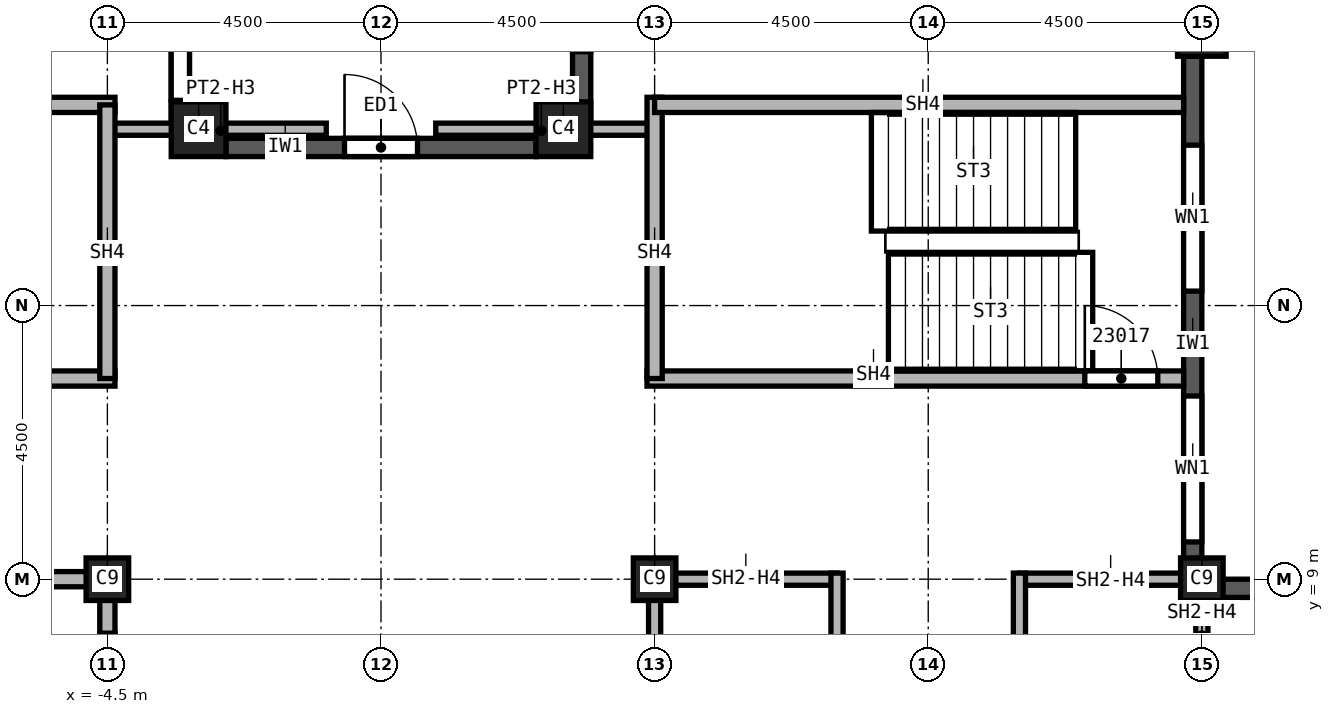
"""IFC4 building model, lengths in metres.
Left out: names, types, materials, properties, quantities, classifications, styles, units other than length and angle.
Written with IfcOpenShell. Run it as: python <this file> out.ifc"""

import sys

from ifc_helpers import new_model, si_unit, direction, frame, frame_2d, origin, origin_2d, place, context, subcontext, project, spatial, rectangle, extrude, element, fill, save


model = new_model("IFC4")
c1 = context("Model", 3, precision=1e-05, world=origin(), true_north=direction((0.0, 1.0)))
c2 = subcontext(c1, "Body", "Model", "MODEL_VIEW")
j1 = project(units=[si_unit("LENGTHUNIT", "METRE"), si_unit("PLANEANGLEUNIT", "RADIAN")], contexts=[c1])
p1 = place(None, origin())
s1 = spatial("IfcSite", under=j1, at=p1, CompositionType="ELEMENT")
p2 = place(p1, origin())
s2 = spatial("IfcBuilding", under=s1, at=p2, CompositionType="ELEMENT")
p3 = place(p2, frame((0.0, 0.0, 326.0)))
s3 = spatial("IfcBuildingStorey", under=s2, at=p3, CompositionType="ELEMENT", Elevation=326.0)
p4 = place(p3, frame((13.5, 18.0, 0.0), z_axis=(0.0, 0.0, 1.0), x_axis=(1.0, 0.0, 0.0)))
e1 = element("IfcColumn", 1, at=p4, inside=s3, PredefinedType="COLUMN", context=c2, shape_type="SweptSolid", body=[
    extrude(rectangle(XDim=0.8, YDim=0.8, at=origin_2d()), origin(), (0.0, 0.0, 1.0), 3.74),
])
for number, where, z_axis, x_axis in (
    (2, (4.5, 9.0, 0.0), (0.0, 0.0, 1.0), (1.0, 0.0, 0.0)),
    (3, (13.5, 9.0, 0.0), (0.0, 0.0, 1.0), (1.0, 0.0, 0.0)),
    (4, (-4.5, 9.0, 0.0), (0.0, 0.0, 1.0), (1.0, 0.0, 0.0)),
):
    element("IfcColumn", number, at=place(p3, frame(where, z_axis=z_axis, x_axis=x_axis)), inside=s3, PredefinedType="COLUMN", context=c2, shape_type="SweptSolid", body=[
        extrude(rectangle(XDim=0.7, YDim=0.7, at=origin_2d()), origin(), (0.0, 0.0, 1.0), 3.74),
    ])
for number, where, z_axis, x_axis in (
    (5, (3.0, 16.4, 0.0), (0.0, 0.0, 1.0), (1.0, 0.0, 0.0)),
    (6, (-3.0, 16.4, 0.0), (0.0, 0.0, 1.0), (1.0, 0.0, 0.0)),
):
    element("IfcColumn", number, at=place(p3, frame(where, z_axis=z_axis, x_axis=x_axis)), inside=s3, PredefinedType="COLUMN", context=c2, shape_type="SweptSolid", body=[
        extrude(rectangle(XDim=0.9, YDim=0.9, at=origin_2d()), origin(), (0.0, 0.0, 1.0), 3.74),
    ])
p5 = place(p3, frame((3.3, 24.95, 0.0), z_axis=(0.0, 0.0, 1.0), x_axis=(0.0, -1.0, 0.0)))
e7 = element("IfcWall", 7, at=p5, inside=s3, PredefinedType="SOLIDWALL", context=c2, shape_type="SweptSolid", body=[
    extrude(rectangle(XDim=8.5, YDim=0.3, at=frame_2d((4.25, 0.0))), origin(), (0.0, 0.0, 1.0), 3.14),
])
p6 = place(p5, frame((0.825, 0.0, 0.8)))
e8 = element("IfcOpeningElement", 8, at=p6, cuts=e7, PredefinedType="OPENING", context=c2, shape_type="SweptSolid", body=[
    extrude(rectangle(XDim=2.4, YDim=1.95, at=frame_2d((1.2, 0.975))), frame((0.0, 0.15, 0.0), z_axis=(0.0, -1.0, 0.0), x_axis=(1.0, 0.0, 0.0)), (0.0, 0.0, 1.0), 0.3),
])
p7 = place(p5, frame((4.875, 0.0, 0.8)))
e9 = element("IfcOpeningElement", 9, at=p7, cuts=e7, PredefinedType="OPENING", context=c2, shape_type="SweptSolid", body=[
    extrude(rectangle(XDim=2.4, YDim=1.95, at=frame_2d((1.2, 0.975))), frame((0.0, 0.15, 0.0), z_axis=(0.0, -1.0, 0.0), x_axis=(1.0, 0.0, 0.0)), (0.0, 0.0, 1.0), 0.3),
])
p8 = place(p3, frame((-2.55, 16.1, 0.0), z_axis=(0.0, 0.0, 1.0), x_axis=(1.0, 0.0, 0.0)))
e10 = element("IfcWall", 10, at=p8, inside=s3, PredefinedType="SOLIDWALL", context=c2, shape_type="SweptSolid", body=[
    extrude(rectangle(XDim=5.1, YDim=0.3, at=frame_2d((2.55, 0.0))), origin(), (0.0, 0.0, 1.0), 3.14),
])
p9 = place(p8, frame((1.95, 0.0, 0.0)))
e11 = element("IfcOpeningElement", 11, at=p9, cuts=e10, PredefinedType="OPENING", context=c2, shape_type="SweptSolid", body=[
    extrude(rectangle(XDim=1.2, YDim=2.4, at=frame_2d((0.6, 1.2))), frame((0.0, 0.15, 0.0), z_axis=(0.0, -1.0, 0.0), x_axis=(1.0, 0.0, 0.0)), (0.0, 0.0, 1.0), 0.3),
])
p10 = place(p3, frame((-3.3, 16.45, 0.0), z_axis=(0.0, 0.0, 1.0), x_axis=(0.0, 1.0, 0.0)))
e12 = element("IfcWall", 12, at=p10, inside=s3, PredefinedType="SOLIDWALL", context=c2, shape_type="SweptSolid", body=[
    extrude(rectangle(XDim=8.5, YDim=0.3, at=frame_2d((4.25, 0.0))), origin(), (0.0, 0.0, 1.0), 3.14),
])
p11 = place(p10, frame((0.425, 0.0, 0.8)))
e13 = element("IfcOpeningElement", 13, at=p11, cuts=e12, PredefinedType="OPENING", context=c2, shape_type="SweptSolid", body=[
    extrude(rectangle(XDim=2.4, YDim=1.95, at=frame_2d((1.2, 0.975))), frame((0.0, 0.15, 0.0), z_axis=(0.0, -1.0, 0.0), x_axis=(1.0, 0.0, 0.0)), (0.0, 0.0, 1.0), 0.3),
])
p12 = place(p10, frame((4.475, 0.0, 0.8)))
e14 = element("IfcOpeningElement", 14, at=p12, cuts=e12, PredefinedType="OPENING", context=c2, shape_type="SweptSolid", body=[
    extrude(rectangle(XDim=2.4, YDim=1.95, at=frame_2d((1.2, 0.975))), frame((0.0, 0.15, 0.0), z_axis=(0.0, -1.0, 0.0), x_axis=(1.0, 0.0, 0.0)), (0.0, 0.0, 1.0), 0.3),
])
p13 = place(p3, frame((13.35, 9.05, 0.0), z_axis=(0.0, 0.0, 1.0), x_axis=(0.0, 1.0, 0.0)))
e15 = element("IfcWall", 15, at=p13, inside=s3, PredefinedType="SOLIDWALL", context=c2, shape_type="SweptSolid", body=[
    extrude(rectangle(XDim=8.55, YDim=0.3, at=frame_2d((4.275, 0.0))), origin(), (0.0, 0.0, 1.0), 3.14),
])
p14 = place(p13, frame((0.562, 0.0, 0.8)))
e16 = element("IfcOpeningElement", 16, at=p14, cuts=e15, PredefinedType="OPENING", context=c2, shape_type="SweptSolid", body=[
    extrude(rectangle(XDim=2.4, YDim=1.95, at=frame_2d((1.2, 0.975))), frame((0.0, 0.15, 0.0), z_axis=(0.0, -1.0, 0.0), x_axis=(1.0, 0.0, 0.0)), (0.0, 0.0, 1.0), 0.3),
])
p15 = place(p13, frame((4.688, 0.0, 0.8)))
e17 = element("IfcOpeningElement", 17, at=p15, cuts=e15, PredefinedType="OPENING", context=c2, shape_type="SweptSolid", body=[
    extrude(rectangle(XDim=2.4, YDim=1.95, at=frame_2d((1.2, 0.975))), frame((0.0, 0.15, 0.0), z_axis=(0.0, -1.0, 0.0), x_axis=(1.0, 0.0, 0.0)), (0.0, 0.0, 1.0), 0.3),
])
p16 = place(p3, frame((22.1, 8.85, 0.0), z_axis=(0.0, 0.0, 1.0), x_axis=(-1.0, 0.0, 0.0)))
e18 = element("IfcWall", 18, at=p16, inside=s3, PredefinedType="SOLIDWALL", context=c2, shape_type="SweptSolid", body=[
    extrude(rectangle(XDim=8.55, YDim=0.3, at=frame_2d((4.275, 0.0))), origin(), (0.0, 0.0, 1.0), 3.14),
])
p17 = place(p16, frame((1.756, 0.0, 0.8)))
e19 = element("IfcOpeningElement", 19, at=p17, cuts=e18, PredefinedType="OPENING", context=c2, shape_type="SweptSolid", body=[
    extrude(rectangle(XDim=1.4, YDim=1.95, at=frame_2d((0.7, 0.975))), frame((0.0, 0.15, 0.0), z_axis=(0.0, -1.0, 0.0), x_axis=(1.0, 0.0, 0.0)), (0.0, 0.0, 1.0), 0.3),
])
p18 = place(p16, frame((5.044, 0.0, 0.8)))
e20 = element("IfcOpeningElement", 20, at=p18, cuts=e18, PredefinedType="OPENING", context=c2, shape_type="SweptSolid", body=[
    extrude(rectangle(XDim=1.4, YDim=1.95, at=frame_2d((0.7, 0.975))), frame((0.0, 0.15, 0.0), z_axis=(0.0, -1.0, 0.0), x_axis=(1.0, 0.0, 0.0)), (0.0, 0.0, 1.0), 0.3),
])
for number, where, z_axis, x_axis in (
    (21, (-4.5, 16.4, 0.0), (0.0, 0.0, 1.0), (1.0, 0.0, 0.0)),
    (22, (0.9, 16.4, 0.0), (0.0, 0.0, 1.0), (1.0, 0.0, 0.0)),
):
    element("IfcWall", number, at=place(p3, frame(where, z_axis=z_axis, x_axis=x_axis)), inside=s3, PredefinedType="PARTITIONING", context=c2, shape_type="SweptSolid", body=[
        extrude(rectangle(XDim=3.6, YDim=0.2, at=frame_2d((1.8, 0.0))), origin(), (0.0, 0.0, 1.0), 3.204),
    ])
p19 = place(p3, frame((4.5, -6.0, 0.0), z_axis=(0.0, 0.0, 1.0), x_axis=(0.0, 1.0, 0.0)))
e23 = element("IfcWall", 23, at=p19, inside=s3, PredefinedType="SOLIDWALL", context=c2, shape_type="SweptSolid", body=[
    extrude(rectangle(XDim=15.1, YDim=0.2, at=frame_2d((7.55, 0.0))), origin(), (0.0, 0.0, 1.0), 3.062),
])
p20 = place(p19, frame((0.25, 0.0, 0.0)))
e24 = element("IfcOpeningElement", 24, at=p20, cuts=e23, PredefinedType="OPENING", context=c2, shape_type="SweptSolid", body=[
    extrude(rectangle(XDim=1.1, YDim=2.1, at=frame_2d((0.55, 1.05))), frame((0.0, 0.1, 0.0), z_axis=(0.0, -1.0, 0.0), x_axis=(1.0, 0.0, 0.0)), (0.0, 0.0, 1.0), 0.2),
])
p21 = place(p19, frame((6.85, 0.0, 0.0)))
e25 = element("IfcOpeningElement", 25, at=p21, cuts=e23, PredefinedType="OPENING", context=c2, shape_type="SweptSolid", body=[
    extrude(rectangle(XDim=1.1, YDim=2.1, at=frame_2d((0.55, 1.05))), frame((0.0, 0.1, 0.0), z_axis=(0.0, -1.0, 0.0), x_axis=(1.0, 0.0, 0.0)), (0.0, 0.0, 1.0), 0.2),
])
p22 = place(p3, frame((4.5, 9.0, 0.0), z_axis=(0.0, 0.0, 1.0), x_axis=(1.0, 0.0, 0.0)))
e26 = element("IfcWall", 26, at=p22, inside=s3, PredefinedType="SOLIDWALL", context=c2, shape_type="SweptSolid", body=[
    extrude(rectangle(XDim=3.0, YDim=0.2, at=frame_2d((1.5, 0.0))), origin(), (0.0, 0.0, 1.0), 3.062),
])
p23 = place(p3, frame((7.5, 9.1, 0.0), z_axis=(0.0, 0.0, 1.0), x_axis=(0.0, -1.0, 0.0)))
e27 = element("IfcWall", 27, at=p23, inside=s3, PredefinedType="SOLIDWALL", context=c2, shape_type="SweptSolid", body=[
    extrude(rectangle(XDim=6.225, YDim=0.2, at=frame_2d((3.113, 0.0))), origin(), (0.0, 0.0, 1.0), 3.74),
])
p24 = place(p3, frame((10.5, 9.0, 0.0), z_axis=(0.0, 0.0, 1.0), x_axis=(1.0, 0.0, 0.0)))
e28 = element("IfcWall", 28, at=p24, inside=s3, PredefinedType="SOLIDWALL", context=c2, shape_type="SweptSolid", body=[
    extrude(rectangle(XDim=3.0, YDim=0.2, at=frame_2d((1.5, 0.0))), origin(), (0.0, 0.0, 1.0), 3.062),
])
p25 = place(p3, frame((10.5, 9.1, 0.0), z_axis=(0.0, 0.0, 1.0), x_axis=(0.0, -1.0, 0.0)))
e29 = element("IfcWall", 29, at=p25, inside=s3, PredefinedType="SOLIDWALL", context=c2, shape_type="SweptSolid", body=[
    extrude(rectangle(XDim=3.225, YDim=0.2, at=frame_2d((1.613, 0.0))), origin(), (0.0, 0.0, 1.0), 3.74),
])
p26 = place(p3, frame((13.5, 9.05, 0.0), z_axis=(0.0, 0.0, 1.0), x_axis=(0.0, -1.0, 0.0)))
e30 = element("IfcWall", 30, at=p26, inside=s3, PredefinedType="SOLIDWALL", context=c2, shape_type="SweptSolid", body=[
    extrude(rectangle(XDim=3.05, YDim=0.2, at=frame_2d((1.525, 0.0))), origin(), (0.0, 0.0, 1.0), 3.062),
])
p27 = place(p26, frame((1.6, 0.0, 0.0)))
e31 = element("IfcOpeningElement", 31, at=p27, cuts=e30, PredefinedType="OPENING", context=c2, shape_type="SweptSolid", body=[
    extrude(rectangle(XDim=1.1, YDim=2.1, at=frame_2d((0.55, 1.05))), frame((0.0, 0.1, 0.0), z_axis=(0.0, -1.0, 0.0), x_axis=(1.0, 0.0, 0.0)), (0.0, 0.0, 1.0), 0.2),
])
p28 = place(p3, frame((-7.5, 9.0, 0.0), z_axis=(0.0, 0.0, 1.0), x_axis=(1.0, 0.0, 0.0)))
e32 = element("IfcWall", 32, at=p28, inside=s3, PredefinedType="SOLIDWALL", context=c2, shape_type="SweptSolid", body=[
    extrude(rectangle(XDim=3.0, YDim=0.25, at=frame_2d((1.5, 0.0))), origin(), (0.0, 0.0, 1.0), 3.062),
])
p29 = place(p3, frame((-4.5, 9.125, 0.0), z_axis=(0.0, 0.0, 1.0), x_axis=(0.0, -1.0, 0.0)))
e33 = element("IfcWall", 33, at=p29, inside=s3, PredefinedType="SOLIDWALL", context=c2, shape_type="SweptSolid", body=[
    extrude(rectangle(XDim=3.125, YDim=0.25, at=frame_2d((1.562, 0.0))), origin(), (0.0, 0.0, 1.0), 3.062),
])
p30 = place(p29, frame((1.012, 0.0, 0.0)))
e34 = element("IfcOpeningElement", 34, at=p30, cuts=e33, PredefinedType="OPENING", context=c2, shape_type="SweptSolid", body=[
    extrude(rectangle(XDim=1.1, YDim=2.1, at=frame_2d((0.55, 1.05))), frame((0.0, 0.125, 0.0), z_axis=(0.0, -1.0, 0.0), x_axis=(1.0, 0.0, 0.0)), (0.0, 0.0, 1.0), 0.25),
])
p31 = place(p3, frame((-13.5, 12.3, 0.0), z_axis=(0.0, 0.0, 1.0), x_axis=(1.0, 0.0, 0.0)))
e35 = element("IfcWall", 35, at=p31, inside=s3, PredefinedType="SOLIDWALL", context=c2, shape_type="SweptSolid", body=[
    extrude(rectangle(XDim=9.125, YDim=0.25, at=frame_2d((4.562, 0.0))), origin(), (0.0, 0.0, 1.0), 3.74),
])
p32 = place(p31, frame((0.6, 0.0, 0.0)))
e36 = element("IfcOpeningElement", 36, at=p32, cuts=e35, PredefinedType="OPENING", context=c2, shape_type="SweptSolid", body=[
    extrude(rectangle(XDim=1.2, YDim=2.1, at=frame_2d((0.6, 1.05))), frame((0.0, 0.125, 0.0), z_axis=(0.0, -1.0, 0.0), x_axis=(1.0, 0.0, 0.0)), (0.0, 0.0, 1.0), 0.25),
])
p33 = place(p3, frame((-13.5, 16.8, 0.0), z_axis=(0.0, 0.0, 1.0), x_axis=(1.0, 0.0, 0.0)))
e37 = element("IfcWall", 37, at=p33, inside=s3, PredefinedType="SOLIDWALL", context=c2, shape_type="SweptSolid", body=[
    extrude(rectangle(XDim=9.125, YDim=0.25, at=frame_2d((4.562, 0.0))), origin(), (0.0, 0.0, 1.0), 3.74),
])
p34 = place(p3, frame((-4.5, 16.8, 0.0), z_axis=(0.0, 0.0, 1.0), x_axis=(0.0, -1.0, 0.0)))
e38 = element("IfcWall", 38, at=p34, inside=s3, PredefinedType="SOLIDWALL", context=c2, shape_type="SweptSolid", body=[
    extrude(rectangle(XDim=4.5, YDim=0.25, at=frame_2d((2.25, 0.0))), origin(), (0.0, 0.0, 1.0), 3.74),
])
p35 = place(p3, frame((4.375, 12.3, 0.0), z_axis=(0.0, 0.0, 1.0), x_axis=(1.0, 0.0, 0.0)))
e39 = element("IfcWall", 39, at=p35, inside=s3, PredefinedType="SOLIDWALL", context=c2, shape_type="SweptSolid", body=[
    extrude(rectangle(XDim=8.825, YDim=0.25, at=frame_2d((4.413, 0.0))), origin(), (0.0, 0.0, 1.0), 3.74),
])
p36 = place(p35, frame((7.2, 0.0, 0.0)))
e40 = element("IfcOpeningElement", 40, at=p36, cuts=e39, PredefinedType="OPENING", context=c2, shape_type="SweptSolid", body=[
    extrude(rectangle(XDim=1.2, YDim=2.1, at=frame_2d((0.6, 1.05))), frame((0.0, 0.125, 0.0), z_axis=(0.0, -1.0, 0.0), x_axis=(1.0, 0.0, 0.0)), (0.0, 0.0, 1.0), 0.25),
])
p37 = place(p3, frame((4.5, 12.3, 0.0), z_axis=(0.0, 0.0, 1.0), x_axis=(0.0, 1.0, 0.0)))
e41 = element("IfcWall", 41, at=p37, inside=s3, PredefinedType="SOLIDWALL", context=c2, shape_type="SweptSolid", body=[
    extrude(rectangle(XDim=4.625, YDim=0.25, at=frame_2d((2.312, 0.0))), origin(), (0.0, 0.0, 1.0), 3.74),
])
p38 = place(p3, frame((4.5, 16.8, 0.0), z_axis=(0.0, 0.0, 1.0), x_axis=(1.0, 0.0, 0.0)))
e42 = element("IfcWall", 42, at=p38, inside=s3, PredefinedType="SOLIDWALL", context=c2, shape_type="SweptSolid", body=[
    extrude(rectangle(XDim=8.7, YDim=0.25, at=frame_2d((4.35, 0.0))), origin(), (0.0, 0.0, 1.0), 3.74),
])
p39 = place(p9, origin())
e43 = element("IfcDoor", 43, at=p39, inside=s3, OperationType="SINGLE_SWING_LEFT", PredefinedType="DOOR", context=c2, shape_type="SweptSolid", body=[
    extrude(rectangle(XDim=1.2, YDim=2.4, at=frame_2d((0.6, 1.2))), frame((0.0, 0.025, 0.0), z_axis=(0.0, -1.0, 0.0), x_axis=(1.0, 0.0, 0.0)), (0.0, 0.0, 1.0), 0.05),
])
fill(e11, e43)
p40 = place(p11, origin())
e44 = element("IfcWindow", 44, at=p40, inside=s3, PartitioningType="SINGLE_PANEL", PredefinedType="WINDOW", context=c2, shape_type="SweptSolid", body=[
    extrude(rectangle(XDim=2.4, YDim=1.95, at=frame_2d((1.2, 0.975))), frame((0.0, 0.03, 0.0), z_axis=(0.0, -1.0, 0.0), x_axis=(1.0, 0.0, 0.0)), (0.0, 0.0, 1.0), 0.06),
])
fill(e13, e44)
p41 = place(p14, origin())
e45 = element("IfcWindow", 45, at=p41, inside=s3, PartitioningType="SINGLE_PANEL", PredefinedType="WINDOW", context=c2, shape_type="SweptSolid", body=[
    extrude(rectangle(XDim=2.4, YDim=1.95, at=frame_2d((1.2, 0.975))), frame((0.0, 0.03, 0.0), z_axis=(0.0, -1.0, 0.0), x_axis=(1.0, 0.0, 0.0)), (0.0, 0.0, 1.0), 0.06),
])
fill(e16, e45)
p42 = place(p15, origin())
e46 = element("IfcWindow", 46, at=p42, inside=s3, PartitioningType="SINGLE_PANEL", PredefinedType="WINDOW", context=c2, shape_type="SweptSolid", body=[
    extrude(rectangle(XDim=2.4, YDim=1.95, at=frame_2d((1.2, 0.975))), frame((0.0, 0.03, 0.0), z_axis=(0.0, -1.0, 0.0), x_axis=(1.0, 0.0, 0.0)), (0.0, 0.0, 1.0), 0.06),
])
fill(e17, e46)
p43 = place(p36, origin())
e47 = element("IfcDoor", 47, at=p43, inside=s3, OperationType="SINGLE_SWING_RIGHT", PredefinedType="DOOR", context=c2, shape_type="SweptSolid", body=[
    extrude(rectangle(XDim=1.2, YDim=2.1, at=frame_2d((0.6, 1.05))), frame((0.0, 0.025, 0.0), z_axis=(0.0, -1.0, 0.0), x_axis=(1.0, 0.0, 0.0)), (0.0, 0.0, 1.0), 0.05),
])
fill(e40, e47)
p44 = place(p30, origin())
e48 = element("IfcDoor", 48, at=p44, inside=s3, OperationType="SLIDING_TO_LEFT", PredefinedType="DOOR", context=c2, shape_type="SweptSolid", body=[
    extrude(rectangle(XDim=1.1, YDim=2.1, at=frame_2d((0.55, 1.05))), frame((0.0, 0.025, 0.0), z_axis=(0.0, -1.0, 0.0), x_axis=(1.0, 0.0, 0.0)), (0.0, 0.0, 1.0), 0.05),
])
fill(e34, e48)
save(model, sys.argv[1])
